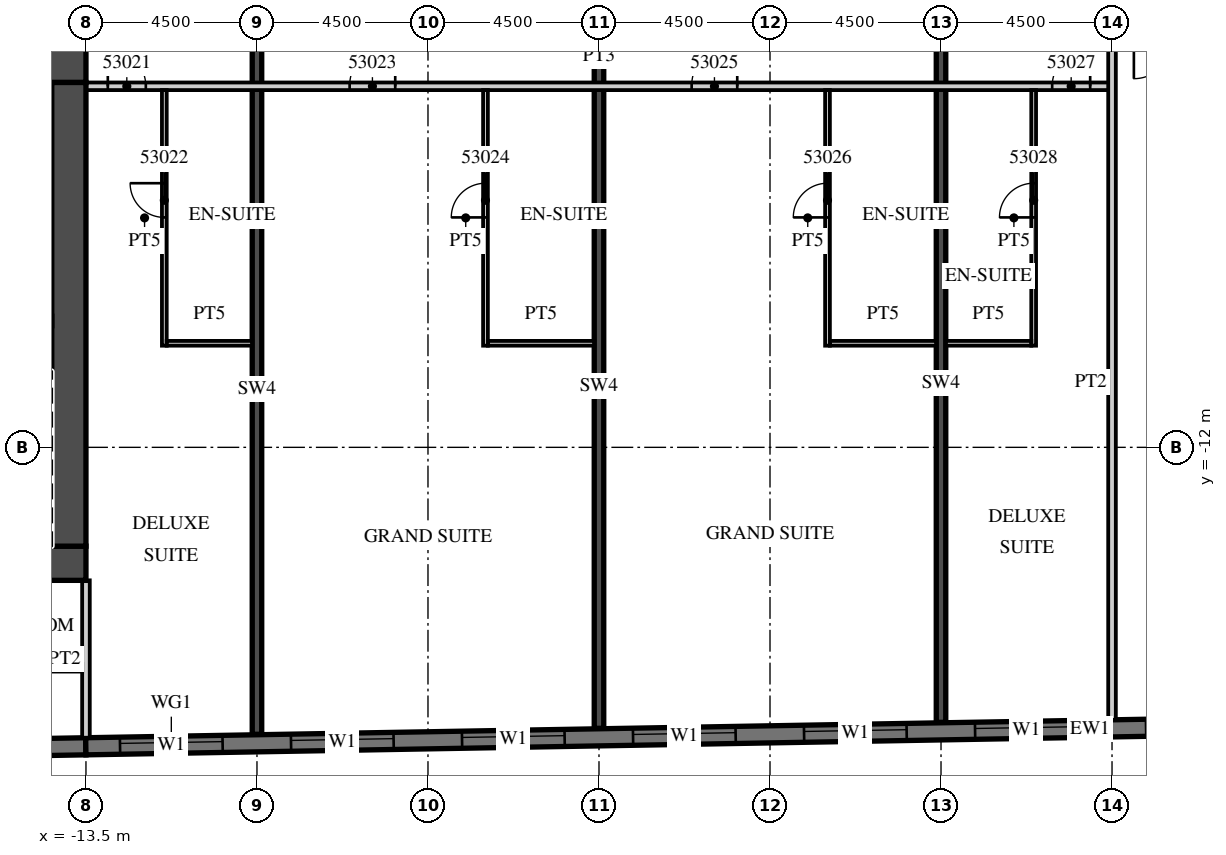
"""IFC4 building model, lengths in metres.
Left out: names, types, materials, properties, quantities, classifications, styles, units other than length and angle.
Written with IfcOpenShell. Run it as: python <this file> out.ifc"""

import sys

from ifc_helpers import new_model, si_unit, direction, frame, frame_2d, origin, place, context, subcontext, project, spatial, rectangle, extrude, element, fill, save


model = new_model("IFC4")
c1 = context("Model", 3, precision=1e-05, world=origin(), true_north=direction((0.0, 1.0)))
c2 = subcontext(c1, "Body", "Model", "MODEL_VIEW")
j1 = project(units=[si_unit("LENGTHUNIT", "METRE"), si_unit("PLANEANGLEUNIT", "RADIAN")], contexts=[c1])
p1 = place(None, origin())
s1 = spatial("IfcSite", under=j1, at=p1, CompositionType="ELEMENT")
p2 = place(p1, origin())
s2 = spatial("IfcBuilding", under=s1, at=p2, CompositionType="ELEMENT")
p3 = place(p2, frame((0.0, 0.0, 221.0)))
s3 = spatial("IfcBuildingStorey", under=s2, at=p3, CompositionType="ELEMENT", Elevation=221.0)
p4 = place(p3, frame((-9.0, -19.55, 0.0), z_axis=(0.0, 0.0, 1.0), x_axis=(0.0, 1.0, 0.0)))
e1 = element("IfcWall", 1, at=p4, inside=s3, PredefinedType="SHEAR", context=c2, shape_type="SweptSolid", body=[
    extrude(rectangle(XDim=18.15, YDim=0.25, at=frame_2d((9.075, 0.0))), origin(), (0.0, 0.0, 1.0), 3.3),
])
p5 = place(p3, frame((0.0, -19.393, 0.0), z_axis=(0.0, 0.0, 1.0), x_axis=(0.0, 1.0, 0.0)))
e2 = element("IfcWall", 2, at=p5, inside=s3, PredefinedType="SHEAR", context=c2, shape_type="SweptSolid", body=[
    extrude(rectangle(XDim=17.993, YDim=0.25, at=frame_2d((8.997, 0.0))), origin(), (0.0, 0.0, 1.0), 3.3),
])
p6 = place(p3, frame((9.0, -19.236, 0.0), z_axis=(0.0, 0.0, 1.0), x_axis=(0.0, 1.0, 0.0)))
e3 = element("IfcWall", 3, at=p6, inside=s3, PredefinedType="SHEAR", context=c2, shape_type="SweptSolid", body=[
    extrude(rectangle(XDim=17.836, YDim=0.25, at=frame_2d((8.918, 0.0))), origin(), (0.0, 0.0, 1.0), 3.3),
])
p7 = place(p3, frame((-31.504, -20.18, 0.0), z_axis=(0.0, 0.0, 1.0), x_axis=(0.999847677887, 0.017453395744, 0.0)))
e4 = element("IfcWall", 4, at=p7, inside=s3, PredefinedType="SOLIDWALL", context=c2, shape_type="SweptSolid", body=[
    extrude(rectangle(XDim=18.003, YDim=0.45, at=frame_2d((9.001, 0.0))), origin(), (0.0, 0.0, 1.0), 3.02),
])
p8 = place(p3, frame((-13.504, -19.866, 0.0), z_axis=(0.0, 0.0, 1.0), x_axis=(0.999847672978, 0.017453676992, 0.0)))
e5 = element("IfcWall", 5, at=p8, inside=s3, PredefinedType="SOLIDWALL", context=c2, shape_type="SweptSolid", body=[
    extrude(rectangle(XDim=52.86, YDim=0.45, at=frame_2d((26.43, 0.0))), origin(), (0.0, 0.0, 1.0), 3.02),
])
p9 = place(p8, frame((0.9, 0.0, 0.45)))
e6 = element("IfcOpeningElement", 6, at=p9, cuts=e5, PredefinedType="OPENING", context=c2, shape_type="SweptSolid", body=[
    extrude(rectangle(XDim=2.7, YDim=2.25, at=frame_2d((1.35, 1.125))), frame((0.0, 0.235, 0.0), z_axis=(0.0, -1.0, 0.0), x_axis=(1.0, 0.0, 0.0)), (0.0, 0.0, 1.0), 0.47),
])
p10 = place(p8, frame((5.401, 0.0, 0.45)))
e7 = element("IfcOpeningElement", 7, at=p10, cuts=e5, PredefinedType="OPENING", context=c2, shape_type="SweptSolid", body=[
    extrude(rectangle(XDim=2.7, YDim=2.25, at=frame_2d((1.35, 1.125))), frame((0.0, 0.235, 0.0), z_axis=(0.0, -1.0, 0.0), x_axis=(1.0, 0.0, 0.0)), (0.0, 0.0, 1.0), 0.47),
])
p11 = place(p8, frame((9.902, 0.0, 0.45)))
e8 = element("IfcOpeningElement", 8, at=p11, cuts=e5, PredefinedType="OPENING", context=c2, shape_type="SweptSolid", body=[
    extrude(rectangle(XDim=2.7, YDim=2.25, at=frame_2d((1.35, 1.125))), frame((0.0, 0.235, 0.0), z_axis=(0.0, -1.0, 0.0), x_axis=(1.0, 0.0, 0.0)), (0.0, 0.0, 1.0), 0.47),
])
p12 = place(p8, frame((14.402, 0.0, 0.45)))
e9 = element("IfcOpeningElement", 9, at=p12, cuts=e5, PredefinedType="OPENING", context=c2, shape_type="SweptSolid", body=[
    extrude(rectangle(XDim=2.7, YDim=2.25, at=frame_2d((1.35, 1.125))), frame((0.0, 0.235, 0.0), z_axis=(0.0, -1.0, 0.0), x_axis=(1.0, 0.0, 0.0)), (0.0, 0.0, 1.0), 0.47),
])
p13 = place(p8, frame((18.903, 0.0, 0.45)))
e10 = element("IfcOpeningElement", 10, at=p13, cuts=e5, PredefinedType="OPENING", context=c2, shape_type="SweptSolid", body=[
    extrude(rectangle(XDim=2.7, YDim=2.25, at=frame_2d((1.35, 1.125))), frame((0.0, 0.235, 0.0), z_axis=(0.0, -1.0, 0.0), x_axis=(1.0, 0.0, 0.0)), (0.0, 0.0, 1.0), 0.47),
])
p14 = place(p8, frame((23.404, 0.0, 0.45)))
e11 = element("IfcOpeningElement", 11, at=p14, cuts=e5, PredefinedType="OPENING", context=c2, shape_type="SweptSolid", body=[
    extrude(rectangle(XDim=2.7, YDim=2.25, at=frame_2d((1.35, 1.125))), frame((0.0, 0.235, 0.0), z_axis=(0.0, -1.0, 0.0), x_axis=(1.0, 0.0, 0.0)), (0.0, 0.0, 1.0), 0.47),
])
p15 = place(p8, frame((27.904, 0.0, 0.45)))
e12 = element("IfcOpeningElement", 12, at=p15, cuts=e5, PredefinedType="OPENING", context=c2, shape_type="SweptSolid", body=[
    extrude(rectangle(XDim=2.7, YDim=2.25, at=frame_2d((1.35, 1.125))), frame((0.0, 0.235, 0.0), z_axis=(0.0, -1.0, 0.0), x_axis=(1.0, 0.0, 0.0)), (0.0, 0.0, 1.0), 0.47),
])
p16 = place(p8, frame((32.405, 0.0, 0.45)))
e13 = element("IfcOpeningElement", 13, at=p16, cuts=e5, PredefinedType="OPENING", context=c2, shape_type="SweptSolid", body=[
    extrude(rectangle(XDim=2.7, YDim=2.25, at=frame_2d((1.35, 1.125))), frame((0.0, 0.235, 0.0), z_axis=(0.0, -1.0, 0.0), x_axis=(1.0, 0.0, 0.0)), (0.0, 0.0, 1.0), 0.47),
])
p17 = place(p8, frame((36.906, 0.0, 0.45)))
e14 = element("IfcOpeningElement", 14, at=p17, cuts=e5, PredefinedType="OPENING", context=c2, shape_type="SweptSolid", body=[
    extrude(rectangle(XDim=2.7, YDim=2.25, at=frame_2d((1.35, 1.125))), frame((0.0, 0.235, 0.0), z_axis=(0.0, -1.0, 0.0), x_axis=(1.0, 0.0, 0.0)), (0.0, 0.0, 1.0), 0.47),
])
p18 = place(p8, frame((41.406, 0.0, 0.45)))
e15 = element("IfcOpeningElement", 15, at=p18, cuts=e5, PredefinedType="OPENING", context=c2, shape_type="SweptSolid", body=[
    extrude(rectangle(XDim=2.7, YDim=2.25, at=frame_2d((1.35, 1.125))), frame((0.0, 0.235, 0.0), z_axis=(0.0, -1.0, 0.0), x_axis=(1.0, 0.0, 0.0)), (0.0, 0.0, 1.0), 0.47),
])
p19 = place(p8, frame((45.907, 0.0, 0.45)))
e16 = element("IfcOpeningElement", 16, at=p19, cuts=e5, PredefinedType="OPENING", context=c2, shape_type="SweptSolid", body=[
    extrude(rectangle(XDim=2.7, YDim=2.25, at=frame_2d((1.35, 1.125))), frame((0.0, 0.235, 0.0), z_axis=(0.0, -1.0, 0.0), x_axis=(1.0, 0.0, 0.0)), (0.0, 0.0, 1.0), 0.47),
])
p20 = place(p3, frame((-13.5, -19.641, 0.0), z_axis=(0.0, 0.0, 1.0), x_axis=(0.0, 1.0, 0.0)))
e17 = element("IfcWall", 17, at=p20, inside=s3, PredefinedType="PARTITIONING", context=c2, shape_type="SweptSolid", body=[
    extrude(rectangle(XDim=4.141, YDim=0.2, at=frame_2d((2.071, 0.0))), origin(), (0.0, 0.0, 1.0), 3.02),
])
p21 = place(p3, frame((-13.5, -2.5, 0.0), z_axis=(0.0, 0.0, 1.0), x_axis=(1.0, 0.0, 0.0)))
e18 = element("IfcWall", 18, at=p21, inside=s3, PredefinedType="PARTITIONING", context=c2, shape_type="SweptSolid", body=[
    extrude(rectangle(XDim=27.0, YDim=0.2, at=frame_2d((13.5, 0.0))), origin(), (0.0, 0.0, 1.0), 3.02),
])
p22 = place(p21, frame((0.575, 0.0, 0.0)))
e19 = element("IfcOpeningElement", 19, at=p22, cuts=e18, PredefinedType="OPENING", context=c2, shape_type="SweptSolid", body=[
    extrude(rectangle(XDim=1.0, YDim=2.1, at=frame_2d((0.5, 1.05))), frame((0.0, 0.11, 0.0), z_axis=(0.0, -1.0, 0.0), x_axis=(1.0, 0.0, 0.0)), (0.0, 0.0, 1.0), 0.22),
])
p23 = place(p21, frame((6.938, 0.0, 0.0)))
e20 = element("IfcOpeningElement", 20, at=p23, cuts=e18, PredefinedType="OPENING", context=c2, shape_type="SweptSolid", body=[
    extrude(rectangle(XDim=1.2, YDim=2.1, at=frame_2d((0.6, 1.05))), frame((0.0, 0.11, 0.0), z_axis=(0.0, -1.0, 0.0), x_axis=(1.0, 0.0, 0.0)), (0.0, 0.0, 1.0), 0.22),
])
p24 = place(p21, frame((15.938, 0.0, 0.0)))
e21 = element("IfcOpeningElement", 21, at=p24, cuts=e18, PredefinedType="OPENING", context=c2, shape_type="SweptSolid", body=[
    extrude(rectangle(XDim=1.2, YDim=2.1, at=frame_2d((0.6, 1.05))), frame((0.0, 0.11, 0.0), z_axis=(0.0, -1.0, 0.0), x_axis=(1.0, 0.0, 0.0)), (0.0, 0.0, 1.0), 0.22),
])
p25 = place(p21, frame((25.425, 0.0, 0.0)))
e22 = element("IfcOpeningElement", 22, at=p25, cuts=e18, PredefinedType="OPENING", context=c2, shape_type="SweptSolid", body=[
    extrude(rectangle(XDim=1.0, YDim=2.1, at=frame_2d((0.5, 1.05))), frame((0.0, 0.11, 0.0), z_axis=(0.0, -1.0, 0.0), x_axis=(1.0, 0.0, 0.0)), (0.0, 0.0, 1.0), 0.22),
])
p26 = place(p3, frame((-11.438, -9.325, 0.0), z_axis=(0.0, 0.0, 1.0), x_axis=(0.0, 1.0, 0.0)))
e23 = element("IfcWall", 23, at=p26, inside=s3, PredefinedType="PARTITIONING", context=c2, shape_type="SweptSolid", body=[
    extrude(rectangle(XDim=6.725, YDim=0.125, at=frame_2d((3.362, 0.0))), origin(), (0.0, 0.0, 1.0), 3.02),
])
p27 = place(p26, frame((3.375, 0.0, 0.0)))
e24 = element("IfcOpeningElement", 24, at=p27, cuts=e23, PredefinedType="OPENING", context=c2, shape_type="SweptSolid", body=[
    extrude(rectangle(XDim=0.9, YDim=2.1, at=frame_2d((0.45, 1.05))), frame((0.0, 0.073, 0.0), z_axis=(0.0, -1.0, 0.0), x_axis=(1.0, 0.0, 0.0)), (0.0, 0.0, 1.0), 0.145),
])
p28 = place(p3, frame((-11.375, -9.262, 0.0), z_axis=(0.0, 0.0, 1.0), x_axis=(1.0, 0.0, 0.0)))
e25 = element("IfcWall", 25, at=p28, inside=s3, PredefinedType="PARTITIONING", context=c2, shape_type="SweptSolid", body=[
    extrude(rectangle(XDim=2.25, YDim=0.125, at=frame_2d((1.125, 0.0))), origin(), (0.0, 0.0, 1.0), 3.02),
])
p29 = place(p3, frame((-2.987, -9.325, 0.0), z_axis=(0.0, 0.0, 1.0), x_axis=(0.0, 1.0, 0.0)))
e26 = element("IfcWall", 26, at=p29, inside=s3, PredefinedType="PARTITIONING", context=c2, shape_type="SweptSolid", body=[
    extrude(rectangle(XDim=6.725, YDim=0.125, at=frame_2d((3.362, 0.0))), origin(), (0.0, 0.0, 1.0), 3.02),
])
p30 = place(p29, frame((3.375, 0.0, 0.0)))
e27 = element("IfcOpeningElement", 27, at=p30, cuts=e26, PredefinedType="OPENING", context=c2, shape_type="SweptSolid", body=[
    extrude(rectangle(XDim=0.9, YDim=2.1, at=frame_2d((0.45, 1.05))), frame((0.0, 0.073, 0.0), z_axis=(0.0, -1.0, 0.0), x_axis=(1.0, 0.0, 0.0)), (0.0, 0.0, 1.0), 0.145),
])
p31 = place(p3, frame((-2.925, -9.262, 0.0), z_axis=(0.0, 0.0, 1.0), x_axis=(1.0, 0.0, 0.0)))
e28 = element("IfcWall", 28, at=p31, inside=s3, PredefinedType="PARTITIONING", context=c2, shape_type="SweptSolid", body=[
    extrude(rectangle(XDim=2.8, YDim=0.125, at=frame_2d((1.4, 0.0))), origin(), (0.0, 0.0, 1.0), 3.02),
])
p32 = place(p3, frame((6.013, -9.325, 0.0), z_axis=(0.0, 0.0, 1.0), x_axis=(0.0, 1.0, 0.0)))
e29 = element("IfcWall", 29, at=p32, inside=s3, PredefinedType="PARTITIONING", context=c2, shape_type="SweptSolid", body=[
    extrude(rectangle(XDim=6.725, YDim=0.125, at=frame_2d((3.362, 0.0))), origin(), (0.0, 0.0, 1.0), 3.02),
])
p33 = place(p32, frame((3.375, 0.0, 0.0)))
e30 = element("IfcOpeningElement", 30, at=p33, cuts=e29, PredefinedType="OPENING", context=c2, shape_type="SweptSolid", body=[
    extrude(rectangle(XDim=0.9, YDim=2.1, at=frame_2d((0.45, 1.05))), frame((0.0, 0.073, 0.0), z_axis=(0.0, -1.0, 0.0), x_axis=(1.0, 0.0, 0.0)), (0.0, 0.0, 1.0), 0.145),
])
p34 = place(p3, frame((6.075, -9.262, 0.0), z_axis=(0.0, 0.0, 1.0), x_axis=(1.0, 0.0, 0.0)))
e31 = element("IfcWall", 31, at=p34, inside=s3, PredefinedType="PARTITIONING", context=c2, shape_type="SweptSolid", body=[
    extrude(rectangle(XDim=2.8, YDim=0.125, at=frame_2d((1.4, 0.0))), origin(), (0.0, 0.0, 1.0), 3.02),
])
p35 = place(p3, frame((13.5, -19.17, 0.0), z_axis=(0.0, 0.0, 1.0), x_axis=(0.0, 1.0, 0.0)))
e32 = element("IfcWall", 32, at=p35, inside=s3, PredefinedType="PARTITIONING", context=c2, shape_type="SweptSolid", body=[
    extrude(rectangle(XDim=17.77, YDim=0.2, at=frame_2d((8.885, 0.0))), origin(), (0.0, 0.0, 1.0), 3.02),
])
p36 = place(p3, frame((11.438, -9.325, 0.0), z_axis=(0.0, 0.0, 1.0), x_axis=(0.0, 1.0, 0.0)))
e33 = element("IfcWall", 33, at=p36, inside=s3, PredefinedType="PARTITIONING", context=c2, shape_type="SweptSolid", body=[
    extrude(rectangle(XDim=6.725, YDim=0.125, at=frame_2d((3.362, 0.0))), origin(), (0.0, 0.0, 1.0), 3.02),
])
p37 = place(p36, frame((3.375, 0.0, 0.0)))
e34 = element("IfcOpeningElement", 34, at=p37, cuts=e33, PredefinedType="OPENING", context=c2, shape_type="SweptSolid", body=[
    extrude(rectangle(XDim=0.9, YDim=2.1, at=frame_2d((0.45, 1.05))), frame((0.0, 0.073, 0.0), z_axis=(0.0, -1.0, 0.0), x_axis=(1.0, 0.0, 0.0)), (0.0, 0.0, 1.0), 0.145),
])
p38 = place(p3, frame((9.125, -9.262, 0.0), z_axis=(0.0, 0.0, 1.0), x_axis=(1.0, 0.0, 0.0)))
e35 = element("IfcWall", 35, at=p38, inside=s3, PredefinedType="PARTITIONING", context=c2, shape_type="SweptSolid", body=[
    extrude(rectangle(XDim=2.25, YDim=0.125, at=frame_2d((1.125, 0.0))), origin(), (0.0, 0.0, 1.0), 3.02),
])
p39 = place(p3, frame((-31.5, -1.95, 0.0), z_axis=(0.0, 0.0, 1.0), x_axis=(1.0, 0.0, 0.0)))
e36 = element("IfcWall", 36, at=p39, inside=s3, PredefinedType="SHEAR", context=c2, shape_type="SweptSolid", body=[
    extrude(rectangle(XDim=18.0, YDim=0.9, at=frame_2d((9.0, 0.0))), origin(), (0.0, 0.0, 1.0), 3.02),
])
p40 = place(p39, frame((14.725, 0.0, 0.0)))
e37 = element("IfcOpeningElement", 37, at=p40, cuts=e36, PredefinedType="OPENING", context=c2, shape_type="SweptSolid", body=[
    extrude(rectangle(XDim=1.8, YDim=2.1, at=frame_2d((0.9, 1.05))), frame((0.0, 0.46, 0.0), z_axis=(0.0, -1.0, 0.0), x_axis=(1.0, 0.0, 0.0)), (0.0, 0.0, 1.0), 0.92),
])
p41 = place(p3, frame((-20.3, -15.05, 0.0), z_axis=(0.0, 0.0, 1.0), x_axis=(1.0, 0.0, 0.0)))
e38 = element("IfcWall", 38, at=p41, inside=s3, PredefinedType="SHEAR", context=c2, shape_type="SweptSolid", body=[
    extrude(rectangle(XDim=6.8, YDim=0.9, at=frame_2d((3.4, 0.0))), origin(), (0.0, 0.0, 1.0), 3.02),
])
p42 = place(p41, frame((0.875, 0.0, 0.0)))
e39 = element("IfcOpeningElement", 39, at=p42, cuts=e38, PredefinedType="OPENING", context=c2, shape_type="SweptSolid", body=[
    extrude(rectangle(XDim=1.2, YDim=2.1, at=frame_2d((0.6, 1.05))), frame((0.0, 0.46, 0.0), z_axis=(0.0, -1.0, 0.0), x_axis=(1.0, 0.0, 0.0)), (0.0, 0.0, 1.0), 0.92),
])
p43 = place(p3, frame((-13.95, -14.6, 0.0), z_axis=(0.0, 0.0, 1.0), x_axis=(0.0, 1.0, 0.0)))
e40 = element("IfcWall", 40, at=p43, inside=s3, PredefinedType="SHEAR", context=c2, shape_type="SweptSolid", body=[
    extrude(rectangle(XDim=12.2, YDim=0.9, at=frame_2d((6.1, 0.0))), origin(), (0.0, 0.0, 1.0), 3.02),
])
p44 = place(p3, frame((-35.864, -17.8, 0.0), z_axis=(0.0, 0.0, 1.0), x_axis=(1.0, 0.0, 0.0)))
e41 = element("IfcWall", 41, at=p44, inside=s3, PredefinedType="PARTITIONING", context=c2, shape_type="SweptSolid", body=[
    extrude(rectangle(XDim=22.264, YDim=0.2, at=frame_2d((11.132, 0.0))), origin(), (0.0, 0.0, 1.0), 3.02),
])
p45 = place(p44, frame((4.751, 0.0, 0.0)))
e42 = element("IfcOpeningElement", 42, at=p45, cuts=e41, PredefinedType="OPENING", context=c2, shape_type="SweptSolid", body=[
    extrude(rectangle(XDim=0.9, YDim=2.1, at=frame_2d((0.45, 1.05))), frame((0.0, 0.11, 0.0), z_axis=(0.0, -1.0, 0.0), x_axis=(1.0, 0.0, 0.0)), (0.0, 0.0, 1.0), 0.22),
])
p46 = place(p44, frame((13.051, 0.0, 0.0)))
e43 = element("IfcOpeningElement", 43, at=p46, cuts=e41, PredefinedType="OPENING", context=c2, shape_type="SweptSolid", body=[
    extrude(rectangle(XDim=0.9, YDim=2.1, at=frame_2d((0.45, 1.05))), frame((0.0, 0.11, 0.0), z_axis=(0.0, -1.0, 0.0), x_axis=(1.0, 0.0, 0.0)), (0.0, 0.0, 1.0), 0.22),
])
p47 = place(p9, origin())
e44 = element("IfcWindow", 44, at=p47, inside=s3, PartitioningType="SINGLE_PANEL", PredefinedType="WINDOW", context=c2, shape_type="SweptSolid", body=[
    extrude(rectangle(XDim=2.7, YDim=2.25, at=frame_2d((1.35, 1.125))), frame((0.0, 0.09, 0.0), z_axis=(0.0, -1.0, 0.0), x_axis=(1.0, 0.0, 0.0)), (0.0, 0.0, 1.0), 0.06),
])
fill(e6, e44)
p48 = place(p10, origin())
e45 = element("IfcWindow", 45, at=p48, inside=s3, PartitioningType="SINGLE_PANEL", PredefinedType="WINDOW", context=c2, shape_type="SweptSolid", body=[
    extrude(rectangle(XDim=2.7, YDim=2.25, at=frame_2d((1.35, 1.125))), frame((0.0, 0.09, 0.0), z_axis=(0.0, -1.0, 0.0), x_axis=(1.0, 0.0, 0.0)), (0.0, 0.0, 1.0), 0.06),
])
fill(e7, e45)
p49 = place(p11, origin())
e46 = element("IfcWindow", 46, at=p49, inside=s3, PartitioningType="SINGLE_PANEL", PredefinedType="WINDOW", context=c2, shape_type="SweptSolid", body=[
    extrude(rectangle(XDim=2.7, YDim=2.25, at=frame_2d((1.35, 1.125))), frame((0.0, 0.09, 0.0), z_axis=(0.0, -1.0, 0.0), x_axis=(1.0, 0.0, 0.0)), (0.0, 0.0, 1.0), 0.06),
])
fill(e8, e46)
p50 = place(p12, origin())
e47 = element("IfcWindow", 47, at=p50, inside=s3, PartitioningType="SINGLE_PANEL", PredefinedType="WINDOW", context=c2, shape_type="SweptSolid", body=[
    extrude(rectangle(XDim=2.7, YDim=2.25, at=frame_2d((1.35, 1.125))), frame((0.0, 0.09, 0.0), z_axis=(0.0, -1.0, 0.0), x_axis=(1.0, 0.0, 0.0)), (0.0, 0.0, 1.0), 0.06),
])
fill(e9, e47)
p51 = place(p13, origin())
e48 = element("IfcWindow", 48, at=p51, inside=s3, PartitioningType="SINGLE_PANEL", PredefinedType="WINDOW", context=c2, shape_type="SweptSolid", body=[
    extrude(rectangle(XDim=2.7, YDim=2.25, at=frame_2d((1.35, 1.125))), frame((0.0, 0.09, 0.0), z_axis=(0.0, -1.0, 0.0), x_axis=(1.0, 0.0, 0.0)), (0.0, 0.0, 1.0), 0.06),
])
fill(e10, e48)
p52 = place(p14, origin())
e49 = element("IfcWindow", 49, at=p52, inside=s3, PartitioningType="SINGLE_PANEL", PredefinedType="WINDOW", context=c2, shape_type="SweptSolid", body=[
    extrude(rectangle(XDim=2.7, YDim=2.25, at=frame_2d((1.35, 1.125))), frame((0.0, 0.09, 0.0), z_axis=(0.0, -1.0, 0.0), x_axis=(1.0, 0.0, 0.0)), (0.0, 0.0, 1.0), 0.06),
])
fill(e11, e49)
p53 = place(p15, origin())
e50 = element("IfcWindow", 50, at=p53, inside=s3, PartitioningType="SINGLE_PANEL", PredefinedType="WINDOW", context=c2, shape_type="SweptSolid", body=[
    extrude(rectangle(XDim=2.7, YDim=2.25, at=frame_2d((1.35, 1.125))), frame((0.0, 0.09, 0.0), z_axis=(0.0, -1.0, 0.0), x_axis=(1.0, 0.0, 0.0)), (0.0, 0.0, 1.0), 0.06),
])
fill(e12, e50)
p54 = place(p22, origin())
e51 = element("IfcDoor", 51, at=p54, inside=s3, OperationType="SINGLE_SWING_LEFT", PredefinedType="DOOR", context=c2, shape_type="SweptSolid", body=[
    extrude(rectangle(XDim=1.0, YDim=2.1, at=frame_2d((0.5, 1.05))), frame((0.0, 0.025, 0.0), z_axis=(0.0, -1.0, 0.0), x_axis=(1.0, 0.0, 0.0)), (0.0, 0.0, 1.0), 0.05),
])
fill(e19, e51)
p55 = place(p27, origin())
e52 = element("IfcDoor", 52, at=p55, inside=s3, OperationType="SINGLE_SWING_RIGHT", PredefinedType="DOOR", context=c2, shape_type="SweptSolid", body=[
    extrude(rectangle(XDim=0.9, YDim=2.1, at=frame_2d((0.45, 1.05))), frame((0.0, 0.025, 0.0), z_axis=(0.0, -1.0, 0.0), x_axis=(1.0, 0.0, 0.0)), (0.0, 0.0, 1.0), 0.05),
])
fill(e24, e52)
p56 = place(p23, origin())
e53 = element("IfcDoor", 53, at=p56, inside=s3, OperationType="SINGLE_SWING_RIGHT", PredefinedType="DOOR", context=c2, shape_type="SweptSolid", body=[
    extrude(rectangle(XDim=1.2, YDim=2.1, at=frame_2d((0.6, 1.05))), frame((0.0, 0.025, 0.0), z_axis=(0.0, -1.0, 0.0), x_axis=(1.0, 0.0, 0.0)), (0.0, 0.0, 1.0), 0.05),
])
fill(e20, e53)
p57 = place(p30, origin())
e54 = element("IfcDoor", 54, at=p57, inside=s3, OperationType="SINGLE_SWING_LEFT", PredefinedType="DOOR", context=c2, shape_type="SweptSolid", body=[
    extrude(rectangle(XDim=0.9, YDim=2.1, at=frame_2d((0.45, 1.05))), frame((0.0, 0.025, 0.0), z_axis=(0.0, -1.0, 0.0), x_axis=(1.0, 0.0, 0.0)), (0.0, 0.0, 1.0), 0.05),
])
fill(e27, e54)
p58 = place(p24, origin())
e55 = element("IfcDoor", 55, at=p58, inside=s3, OperationType="SINGLE_SWING_RIGHT", PredefinedType="DOOR", context=c2, shape_type="SweptSolid", body=[
    extrude(rectangle(XDim=1.2, YDim=2.1, at=frame_2d((0.6, 1.05))), frame((0.0, 0.025, 0.0), z_axis=(0.0, -1.0, 0.0), x_axis=(1.0, 0.0, 0.0)), (0.0, 0.0, 1.0), 0.05),
])
fill(e21, e55)
p59 = place(p33, origin())
e56 = element("IfcDoor", 56, at=p59, inside=s3, OperationType="SINGLE_SWING_LEFT", PredefinedType="DOOR", context=c2, shape_type="SweptSolid", body=[
    extrude(rectangle(XDim=0.9, YDim=2.1, at=frame_2d((0.45, 1.05))), frame((0.0, 0.025, 0.0), z_axis=(0.0, -1.0, 0.0), x_axis=(1.0, 0.0, 0.0)), (0.0, 0.0, 1.0), 0.05),
])
fill(e30, e56)
p60 = place(p25, origin())
e57 = element("IfcDoor", 57, at=p60, inside=s3, OperationType="SINGLE_SWING_RIGHT", PredefinedType="DOOR", context=c2, shape_type="SweptSolid", body=[
    extrude(rectangle(XDim=1.0, YDim=2.1, at=frame_2d((0.5, 1.05))), frame((0.0, 0.025, 0.0), z_axis=(0.0, -1.0, 0.0), x_axis=(1.0, 0.0, 0.0)), (0.0, 0.0, 1.0), 0.05),
])
fill(e22, e57)
p61 = place(p37, origin())
e58 = element("IfcDoor", 58, at=p61, inside=s3, OperationType="SINGLE_SWING_LEFT", PredefinedType="DOOR", context=c2, shape_type="SweptSolid", body=[
    extrude(rectangle(XDim=0.9, YDim=2.1, at=frame_2d((0.45, 1.05))), frame((0.0, 0.025, 0.0), z_axis=(0.0, -1.0, 0.0), x_axis=(1.0, 0.0, 0.0)), (0.0, 0.0, 1.0), 0.05),
])
fill(e34, e58)
save(model, sys.argv[1])
